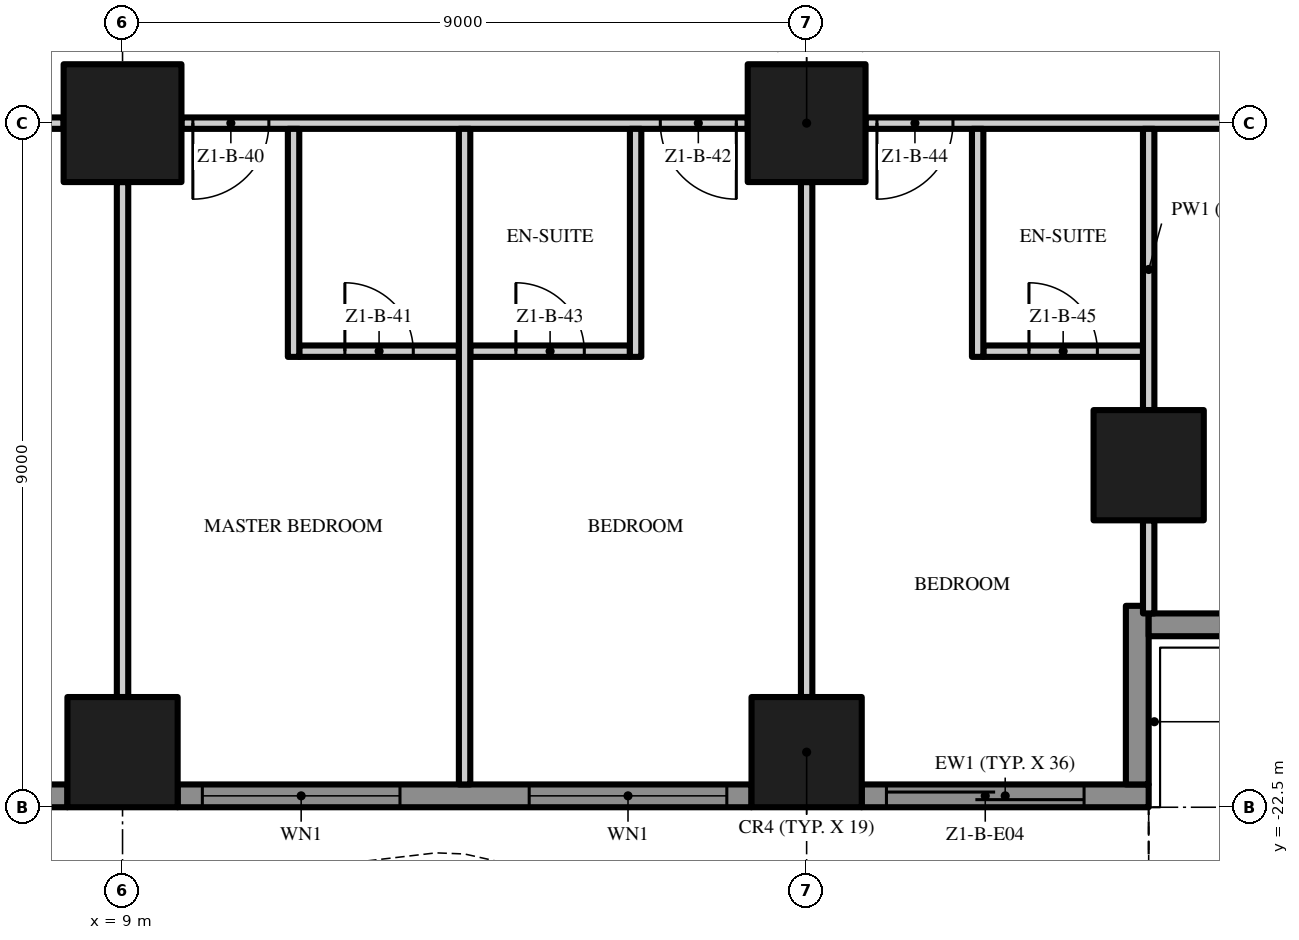
"""IFC4 building model, lengths in metres.
Left out: names, types, materials, properties, quantities, classifications, styles, units other than length and angle.
Written with IfcOpenShell. Run it as: python <this file> out.ifc"""

import sys

from ifc_helpers import new_model, si_unit, direction, frame, frame_2d, origin, origin_2d, place, context, subcontext, project, spatial, polyline, rectangle, outline, extrude, element, fill, save


model = new_model("IFC4")
c1 = context("Model", 3, precision=1e-05, world=origin(), true_north=direction((0.0, 1.0)))
c2 = subcontext(c1, "Body", "Model", "MODEL_VIEW")
j1 = project(units=[si_unit("LENGTHUNIT", "METRE"), si_unit("PLANEANGLEUNIT", "RADIAN")], contexts=[c1])
p1 = place(None, origin())
s1 = spatial("IfcSite", under=j1, at=p1, CompositionType="ELEMENT")
p2 = place(p1, origin())
s2 = spatial("IfcBuilding", under=s1, at=p2, CompositionType="ELEMENT")
p3 = place(p2, frame((0.0, 0.0, 26.4)))
s3 = spatial("IfcBuildingStorey", under=s2, at=p3, CompositionType="ELEMENT", Elevation=26.4)
p4 = place(p3, frame((18.0, -13.5, 0.0), z_axis=(0.0, 0.0, 1.0), x_axis=(1.0, 0.0, 0.0)))
e1 = element("IfcColumn", 1, at=p4, inside=s3, PredefinedType="COLUMN", context=c2, shape_type="SweptSolid", body=[
    extrude(rectangle(XDim=1.55, YDim=1.55, at=origin_2d()), origin(), (0.0, 0.0, 1.0), 3.5),
])
for number, where, z_axis, x_axis in (
    (2, (18.0, -21.775, 0.0), (0.0, 0.0, 1.0), (1.0, 0.0, 0.0)),
    (3, (22.5, -18.0, 0.0), (0.0, 0.0, 1.0), (1.0, 0.0, 0.0)),
):
    element("IfcColumn", number, at=place(p3, frame(where, z_axis=z_axis, x_axis=x_axis)), inside=s3, PredefinedType="COLUMN", context=c2, shape_type="SweptSolid", body=[
        extrude(rectangle(XDim=1.45, YDim=1.45, at=origin_2d()), origin(), (0.0, 0.0, 1.0), 3.5),
    ])
p5 = place(p3, frame((9.0, -13.5, 0.0), z_axis=(0.0, 0.0, 1.0), x_axis=(1.0, 0.0, 0.0)))
e4 = element("IfcColumn", 4, at=p5, inside=s3, PredefinedType="COLUMN", context=c2, shape_type="SweptSolid", body=[
    extrude(rectangle(XDim=1.55, YDim=1.55, at=origin_2d()), origin(), (0.0, 0.0, 1.0), 3.5),
])
p6 = place(p3, frame((9.0, -21.775, 0.0), z_axis=(0.0, 0.0, 1.0), x_axis=(1.0, 0.0, 0.0)))
e5 = element("IfcColumn", 5, at=p6, inside=s3, PredefinedType="COLUMN", context=c2, shape_type="SweptSolid", body=[
    extrude(rectangle(XDim=1.45, YDim=1.45, at=origin_2d()), origin(), (0.0, 0.0, 1.0), 3.5),
])
p7 = place(p3, frame((8.275, -22.35, 0.0), z_axis=(0.0, 0.0, 1.0), x_axis=(-1.0, 0.0, 0.0)))
e6 = element("IfcWall", 6, at=p7, inside=s3, PredefinedType="SOLIDWALL", context=c2, shape_type="SweptSolid", body=[
    extrude(rectangle(XDim=7.55, YDim=0.3, at=frame_2d((3.775, 0.0))), origin(), (0.0, 0.0, 1.0), 3.5),
])
p8 = place(p7, frame((4.625, 0.0, 0.45)))
e7 = element("IfcOpeningElement", 7, at=p8, cuts=e6, PredefinedType="OPENING", context=c2, shape_type="SweptSolid", body=[
    extrude(rectangle(XDim=2.6, YDim=2.65, at=frame_2d((1.3, 1.325))), frame((0.0, 0.16, 0.0), z_axis=(0.0, -1.0, 0.0), x_axis=(1.0, 0.0, 0.0)), (0.0, 0.0, 1.0), 0.32),
])
p9 = place(p7, frame((0.325, 0.0, 0.0)))
e8 = element("IfcOpeningElement", 8, at=p9, cuts=e6, PredefinedType="OPENING", context=c2, shape_type="SweptSolid", body=[
    extrude(rectangle(XDim=2.6, YDim=2.4, at=frame_2d((1.3, 1.2))), frame((0.0, 0.16, 0.0), z_axis=(0.0, -1.0, 0.0), x_axis=(1.0, 0.0, 0.0)), (0.0, 0.0, 1.0), 0.32),
])
p10 = place(p3, frame((17.275, -22.35, 0.0), z_axis=(0.0, 0.0, 1.0), x_axis=(-1.0, 0.0, 0.0)))
e9 = element("IfcWall", 9, at=p10, inside=s3, PredefinedType="SOLIDWALL", context=c2, shape_type="SweptSolid", body=[
    extrude(rectangle(XDim=7.55, YDim=0.3, at=frame_2d((3.775, 0.0))), origin(), (0.0, 0.0, 1.0), 3.5),
])
p11 = place(p10, frame((4.625, 0.0, 0.45)))
e10 = element("IfcOpeningElement", 10, at=p11, cuts=e9, PredefinedType="OPENING", context=c2, shape_type="SweptSolid", body=[
    extrude(rectangle(XDim=2.6, YDim=2.65, at=frame_2d((1.3, 1.325))), frame((0.0, 0.16, 0.0), z_axis=(0.0, -1.0, 0.0), x_axis=(1.0, 0.0, 0.0)), (0.0, 0.0, 1.0), 0.32),
])
p12 = place(p10, frame((0.325, 0.0, 0.45)))
e11 = element("IfcOpeningElement", 11, at=p12, cuts=e9, PredefinedType="OPENING", context=c2, shape_type="SweptSolid", body=[
    extrude(rectangle(XDim=2.6, YDim=2.65, at=frame_2d((1.3, 1.325))), frame((0.0, 0.16, 0.0), z_axis=(0.0, -1.0, 0.0), x_axis=(1.0, 0.0, 0.0)), (0.0, 0.0, 1.0), 0.32),
])
p13 = place(p3, frame((22.5, -22.35, 0.0), z_axis=(0.0, 0.0, 1.0), x_axis=(-1.0, 0.0, 0.0)))
e12 = element("IfcWall", 12, at=p13, inside=s3, PredefinedType="SOLIDWALL", context=c2, shape_type="SweptSolid", body=[
    extrude(rectangle(XDim=3.775, YDim=0.3, at=frame_2d((1.887, 0.0))), origin(), (0.0, 0.0, 1.0), 3.5),
])
p14 = place(p13, frame((0.85, 0.0, 0.0)))
e13 = element("IfcOpeningElement", 13, at=p14, cuts=e12, PredefinedType="OPENING", context=c2, shape_type="SweptSolid", body=[
    extrude(rectangle(XDim=2.6, YDim=2.4, at=frame_2d((1.3, 1.2))), frame((0.0, 0.16, 0.0), z_axis=(0.0, -1.0, 0.0), x_axis=(1.0, 0.0, 0.0)), (0.0, 0.0, 1.0), 0.32),
])
p15 = place(p3, frame((22.35, -19.85, 0.0), z_axis=(0.0, 0.0, 1.0), x_axis=(0.0, -1.0, 0.0)))
e14 = element("IfcWall", 14, at=p15, inside=s3, PredefinedType="SOLIDWALL", context=c2, shape_type="SweptSolid", body=[
    extrude(rectangle(XDim=2.35, YDim=0.3, at=frame_2d((1.175, 0.0))), origin(), (0.0, 0.0, 1.0), 3.5),
])
p16 = place(p3, frame((24.75, -20.1, 0.0), z_axis=(0.0, 0.0, 1.0), x_axis=(-1.0, 0.0, 0.0)))
e15 = element("IfcWall", 15, at=p16, inside=s3, PredefinedType="SOLIDWALL", context=c2, shape_type="SweptSolid", body=[
    extrude(rectangle(XDim=2.25, YDim=0.3, at=frame_2d((1.125, 0.0))), origin(), (0.0, 0.0, 1.0), 3.5),
])
p17 = place(p3, origin())
e16 = element("IfcWall", 16, at=p17, inside=s3, PredefinedType="USERDEFINED", context=c2, shape_type="SweptSolid", body=[
    extrude(outline(polyline([(-22.5, -25.149), (-21.0, -24.488), (-19.5, -23.755), (-18.0, -23.231), (-16.875, -23.1), (-16.5, -23.115), (-15.0, -23.451), (-13.5, -24.112), (-12.0, -24.845), (-10.5, -25.369), (-9.375, -25.5), (-9.0, -25.485), (-7.5, -25.149), (-6.0, -24.488), (-4.5, -23.755), (-3.0, -23.231), (-1.875, -23.1), (-1.5, -23.115), (0.0, -23.451), (1.5, -24.112), (3.0, -24.845), (4.5, -25.369), (5.625, -25.5), (6.0, -25.485), (7.5, -25.149), (9.0, -24.488), (10.5, -23.755), (12.0, -23.231), (13.125, -23.1), (13.5, -23.115), (15.0, -23.451), (16.5, -24.112), (18.0, -24.845), (19.5, -25.369), (20.625, -25.5), (21.0, -25.485), (22.5, -25.149), (22.445, -24.905), (20.967, -25.236), (20.635, -25.249), (19.556, -25.124), (18.096, -24.614), (16.605, -23.885), (15.079, -23.213), (13.533, -22.866), (13.115, -22.849), (11.944, -22.986), (10.404, -23.524), (8.895, -24.261), (7.421, -24.91), (5.967, -25.236), (5.635, -25.249), (4.556, -25.124), (3.096, -24.614), (1.605, -23.885), (0.079, -23.213), (-1.467, -22.866), (-1.885, -22.849), (-3.056, -22.986), (-4.596, -23.524), (-6.105, -24.261), (-7.579, -24.91), (-9.033, -25.236), (-9.365, -25.249), (-10.444, -25.124), (-11.904, -24.614), (-13.395, -23.885), (-14.921, -23.213), (-16.467, -22.866), (-16.885, -22.849), (-18.056, -22.986), (-19.596, -23.524), (-21.105, -24.261), (-22.601, -24.92), (-22.5, -25.149)])), origin(), (0.0, 0.0, 1.0), 0.9),
])
p18 = place(p3, frame((11.325, -16.5, 0.0), z_axis=(0.0, 0.0, 1.0), x_axis=(1.0, 0.0, 0.0)))
e17 = element("IfcWall", 17, at=p18, inside=s3, PredefinedType="PARTITIONING", context=c2, shape_type="SweptSolid", body=[
    extrude(rectangle(XDim=2.1, YDim=0.15, at=frame_2d((1.05, 0.0))), origin(), (0.0, 0.0, 1.0), 3.5),
])
p19 = place(p18, frame((0.6, 0.0, 0.0)))
e18 = element("IfcOpeningElement", 18, at=p19, cuts=e17, PredefinedType="OPENING", context=c2, shape_type="SweptSolid", body=[
    extrude(rectangle(XDim=0.9, YDim=2.1, at=frame_2d((0.45, 1.05))), frame((0.0, 0.085, 0.0), z_axis=(0.0, -1.0, 0.0), x_axis=(1.0, 0.0, 0.0)), (0.0, 0.0, 1.0), 0.17),
])
p20 = place(p3, frame((13.575, -16.5, 0.0), z_axis=(0.0, 0.0, 1.0), x_axis=(1.0, 0.0, 0.0)))
e19 = element("IfcWall", 19, at=p20, inside=s3, PredefinedType="PARTITIONING", context=c2, shape_type="SweptSolid", body=[
    extrude(rectangle(XDim=2.1, YDim=0.15, at=frame_2d((1.05, 0.0))), origin(), (0.0, 0.0, 1.0), 3.5),
])
p21 = place(p20, frame((0.6, 0.0, 0.0)))
e20 = element("IfcOpeningElement", 20, at=p21, cuts=e19, PredefinedType="OPENING", context=c2, shape_type="SweptSolid", body=[
    extrude(rectangle(XDim=0.9, YDim=2.1, at=frame_2d((0.45, 1.05))), frame((0.0, 0.085, 0.0), z_axis=(0.0, -1.0, 0.0), x_axis=(1.0, 0.0, 0.0)), (0.0, 0.0, 1.0), 0.17),
])
p22 = place(p3, frame((20.325, -16.5, 0.0), z_axis=(0.0, 0.0, 1.0), x_axis=(1.0, 0.0, 0.0)))
e21 = element("IfcWall", 21, at=p22, inside=s3, PredefinedType="PARTITIONING", context=c2, shape_type="SweptSolid", body=[
    extrude(rectangle(XDim=2.1, YDim=0.15, at=frame_2d((1.05, 0.0))), origin(), (0.0, 0.0, 1.0), 3.5),
])
p23 = place(p22, frame((0.6, 0.0, 0.0)))
e22 = element("IfcOpeningElement", 22, at=p23, cuts=e21, PredefinedType="OPENING", context=c2, shape_type="SweptSolid", body=[
    extrude(rectangle(XDim=0.9, YDim=2.1, at=frame_2d((0.45, 1.05))), frame((0.0, 0.085, 0.0), z_axis=(0.0, -1.0, 0.0), x_axis=(1.0, 0.0, 0.0)), (0.0, 0.0, 1.0), 0.17),
])
p24 = place(p3, frame((8.225, -13.5, 0.0), z_axis=(0.0, 0.0, 1.0), x_axis=(-1.0, 0.0, 0.0)))
e23 = element("IfcWall", 23, at=p24, inside=s3, PredefinedType="PARTITIONING", context=c2, shape_type="SweptSolid", body=[
    extrude(rectangle(XDim=7.45, YDim=0.15, at=frame_2d((3.725, 0.0))), origin(), (0.0, 0.0, 1.0), 3.5),
])
p25 = place(p24, frame((1.725, 0.0, 0.0)))
e24 = element("IfcOpeningElement", 24, at=p25, cuts=e23, PredefinedType="OPENING", context=c2, shape_type="SweptSolid", body=[
    extrude(rectangle(XDim=1.8, YDim=2.4, at=frame_2d((0.9, 1.2))), frame((0.0, 0.085, 0.0), z_axis=(0.0, -1.0, 0.0), x_axis=(1.0, 0.0, 0.0)), (0.0, 0.0, 1.0), 0.17),
])
p26 = place(p3, frame((17.225, -13.5, 0.0), z_axis=(0.0, 0.0, 1.0), x_axis=(-1.0, 0.0, 0.0)))
e25 = element("IfcWall", 25, at=p26, inside=s3, PredefinedType="PARTITIONING", context=c2, shape_type="SweptSolid", body=[
    extrude(rectangle(XDim=7.45, YDim=0.15, at=frame_2d((3.725, 0.0))), origin(), (0.0, 0.0, 1.0), 3.5),
])
p27 = place(p26, frame((6.3, 0.0, 0.0)))
e26 = element("IfcOpeningElement", 26, at=p27, cuts=e25, PredefinedType="OPENING", context=c2, shape_type="SweptSolid", body=[
    extrude(rectangle(XDim=1.0, YDim=2.4, at=frame_2d((0.5, 1.2))), frame((0.0, 0.085, 0.0), z_axis=(0.0, -1.0, 0.0), x_axis=(1.0, 0.0, 0.0)), (0.0, 0.0, 1.0), 0.17),
])
p28 = place(p26, frame((0.15, 0.0, 0.0)))
e27 = element("IfcOpeningElement", 27, at=p28, cuts=e25, PredefinedType="OPENING", context=c2, shape_type="SweptSolid", body=[
    extrude(rectangle(XDim=1.0, YDim=2.4, at=frame_2d((0.5, 1.2))), frame((0.0, 0.085, 0.0), z_axis=(0.0, -1.0, 0.0), x_axis=(1.0, 0.0, 0.0)), (0.0, 0.0, 1.0), 0.17),
])
p29 = place(p3, frame((25.55, -13.5, 0.0), z_axis=(0.0, 0.0, 1.0), x_axis=(-1.0, 0.0, 0.0)))
e28 = element("IfcWall", 28, at=p29, inside=s3, PredefinedType="PARTITIONING", context=c2, shape_type="SweptSolid", body=[
    extrude(rectangle(XDim=6.775, YDim=0.15, at=frame_2d((3.388, 0.0))), origin(), (0.0, 0.0, 1.0), 3.5),
])
p30 = place(p29, frame((5.625, 0.0, 0.0)))
e29 = element("IfcOpeningElement", 29, at=p30, cuts=e28, PredefinedType="OPENING", context=c2, shape_type="SweptSolid", body=[
    extrude(rectangle(XDim=1.0, YDim=2.4, at=frame_2d((0.5, 1.2))), frame((0.0, 0.085, 0.0), z_axis=(0.0, -1.0, 0.0), x_axis=(1.0, 0.0, 0.0)), (0.0, 0.0, 1.0), 0.17),
])
p31 = place(p29, frame((0.15, 0.0, 0.0)))
e30 = element("IfcOpeningElement", 30, at=p31, cuts=e28, PredefinedType="OPENING", context=c2, shape_type="SweptSolid", body=[
    extrude(rectangle(XDim=1.5, YDim=2.4, at=frame_2d((0.75, 1.2))), frame((0.0, 0.085, 0.0), z_axis=(0.0, -1.0, 0.0), x_axis=(1.0, 0.0, 0.0)), (0.0, 0.0, 1.0), 0.17),
])
p32 = place(p3, frame((9.0, -21.05, 0.0), z_axis=(0.0, 0.0, 1.0), x_axis=(0.0, 1.0, 0.0)))
e31 = element("IfcWall", 31, at=p32, inside=s3, PredefinedType="PARTITIONING", context=c2, shape_type="SweptSolid", body=[
    extrude(rectangle(XDim=6.775, YDim=0.15, at=frame_2d((3.388, 0.0))), origin(), (0.0, 0.0, 1.0), 3.5),
])
p33 = place(p3, frame((11.25, -16.575, 0.0), z_axis=(0.0, 0.0, 1.0), x_axis=(0.0, 1.0, 0.0)))
e32 = element("IfcWall", 32, at=p33, inside=s3, PredefinedType="PARTITIONING", context=c2, shape_type="SweptSolid", body=[
    extrude(rectangle(XDim=3.0, YDim=0.15, at=frame_2d((1.5, 0.0))), origin(), (0.0, 0.0, 1.0), 3.5),
])
p34 = place(p3, frame((13.5, -22.2, 0.0), z_axis=(0.0, 0.0, 1.0), x_axis=(0.0, 1.0, 0.0)))
e33 = element("IfcWall", 33, at=p34, inside=s3, PredefinedType="PARTITIONING", context=c2, shape_type="SweptSolid", body=[
    extrude(rectangle(XDim=8.625, YDim=0.15, at=frame_2d((4.312, 0.0))), origin(), (0.0, 0.0, 1.0), 3.5),
])
p35 = place(p3, frame((15.75, -16.575, 0.0), z_axis=(0.0, 0.0, 1.0), x_axis=(0.0, 1.0, 0.0)))
e34 = element("IfcWall", 34, at=p35, inside=s3, PredefinedType="PARTITIONING", context=c2, shape_type="SweptSolid", body=[
    extrude(rectangle(XDim=3.0, YDim=0.15, at=frame_2d((1.5, 0.0))), origin(), (0.0, 0.0, 1.0), 3.5),
])
p36 = place(p3, frame((18.0, -21.05, 0.0), z_axis=(0.0, 0.0, 1.0), x_axis=(0.0, 1.0, 0.0)))
e35 = element("IfcWall", 35, at=p36, inside=s3, PredefinedType="PARTITIONING", context=c2, shape_type="SweptSolid", body=[
    extrude(rectangle(XDim=6.775, YDim=0.15, at=frame_2d((3.388, 0.0))), origin(), (0.0, 0.0, 1.0), 3.5),
])
p37 = place(p3, frame((20.25, -16.575, 0.0), z_axis=(0.0, 0.0, 1.0), x_axis=(0.0, 1.0, 0.0)))
e36 = element("IfcWall", 36, at=p37, inside=s3, PredefinedType="PARTITIONING", context=c2, shape_type="SweptSolid", body=[
    extrude(rectangle(XDim=3.0, YDim=0.15, at=frame_2d((1.5, 0.0))), origin(), (0.0, 0.0, 1.0), 3.5),
])
p38 = place(p3, frame((22.5, -19.95, 0.0), z_axis=(0.0, 0.0, 1.0), x_axis=(0.0, 1.0, 0.0)))
e37 = element("IfcWall", 37, at=p38, inside=s3, PredefinedType="PARTITIONING", context=c2, shape_type="SweptSolid", body=[
    extrude(rectangle(XDim=1.225, YDim=0.15, at=frame_2d((0.613, 0.0))), origin(), (0.0, 0.0, 1.0), 3.5),
])
p39 = place(p3, frame((22.5, -17.275, 0.0), z_axis=(0.0, 0.0, 1.0), x_axis=(0.0, 1.0, 0.0)))
e38 = element("IfcWall", 38, at=p39, inside=s3, PredefinedType="PARTITIONING", context=c2, shape_type="SweptSolid", body=[
    extrude(rectangle(XDim=3.7, YDim=0.15, at=frame_2d((1.85, 0.0))), origin(), (0.0, 0.0, 1.0), 3.5),
])
p40 = place(p11, origin())
e39 = element("IfcWindow", 39, at=p40, inside=s3, PartitioningType="SINGLE_PANEL", PredefinedType="WINDOW", context=c2, shape_type="SweptSolid", body=[
    extrude(rectangle(XDim=2.6, YDim=2.65, at=frame_2d((1.3, 1.325))), frame((0.0, 0.03, 0.0), z_axis=(0.0, -1.0, 0.0), x_axis=(1.0, 0.0, 0.0)), (0.0, 0.0, 1.0), 0.06),
])
fill(e10, e39)
p41 = place(p12, origin())
e40 = element("IfcWindow", 40, at=p41, inside=s3, PartitioningType="SINGLE_PANEL", PredefinedType="WINDOW", context=c2, shape_type="SweptSolid", body=[
    extrude(rectangle(XDim=2.6, YDim=2.65, at=frame_2d((1.3, 1.325))), frame((0.0, 0.03, 0.0), z_axis=(0.0, -1.0, 0.0), x_axis=(1.0, 0.0, 0.0)), (0.0, 0.0, 1.0), 0.06),
])
fill(e11, e40)
p42 = place(p14, origin())
e41 = element("IfcDoor", 41, at=p42, inside=s3, OperationType="SINGLE_SWING_LEFT", PredefinedType="DOOR", context=c2, shape_type="SweptSolid", body=[
    extrude(rectangle(XDim=2.6, YDim=2.4, at=frame_2d((1.3, 1.2))), frame((0.0, 0.025, 0.0), z_axis=(0.0, -1.0, 0.0), x_axis=(1.0, 0.0, 0.0)), (0.0, 0.0, 1.0), 0.05),
])
fill(e13, e41)
p43 = place(p27, origin())
e42 = element("IfcDoor", 42, at=p43, inside=s3, OperationType="SINGLE_SWING_RIGHT", PredefinedType="DOOR", context=c2, shape_type="SweptSolid", body=[
    extrude(rectangle(XDim=1.0, YDim=2.4, at=frame_2d((0.5, 1.2))), frame((0.0, 0.025, 0.0), z_axis=(0.0, -1.0, 0.0), x_axis=(1.0, 0.0, 0.0)), (0.0, 0.0, 1.0), 0.05),
])
fill(e26, e42)
p44 = place(p19, origin())
e43 = element("IfcDoor", 43, at=p44, inside=s3, OperationType="SINGLE_SWING_LEFT", PredefinedType="DOOR", context=c2, shape_type="SweptSolid", body=[
    extrude(rectangle(XDim=0.9, YDim=2.1, at=frame_2d((0.45, 1.05))), frame((0.0, 0.025, 0.0), z_axis=(0.0, -1.0, 0.0), x_axis=(1.0, 0.0, 0.0)), (0.0, 0.0, 1.0), 0.05),
])
fill(e18, e43)
p45 = place(p28, origin())
e44 = element("IfcDoor", 44, at=p45, inside=s3, OperationType="SINGLE_SWING_LEFT", PredefinedType="DOOR", context=c2, shape_type="SweptSolid", body=[
    extrude(rectangle(XDim=1.0, YDim=2.4, at=frame_2d((0.5, 1.2))), frame((0.0, 0.025, 0.0), z_axis=(0.0, -1.0, 0.0), x_axis=(1.0, 0.0, 0.0)), (0.0, 0.0, 1.0), 0.05),
])
fill(e27, e44)
p46 = place(p21, origin())
e45 = element("IfcDoor", 45, at=p46, inside=s3, OperationType="SINGLE_SWING_LEFT", PredefinedType="DOOR", context=c2, shape_type="SweptSolid", body=[
    extrude(rectangle(XDim=0.9, YDim=2.1, at=frame_2d((0.45, 1.05))), frame((0.0, 0.025, 0.0), z_axis=(0.0, -1.0, 0.0), x_axis=(1.0, 0.0, 0.0)), (0.0, 0.0, 1.0), 0.05),
])
fill(e20, e45)
p47 = place(p30, origin())
e46 = element("IfcDoor", 46, at=p47, inside=s3, OperationType="SINGLE_SWING_RIGHT", PredefinedType="DOOR", context=c2, shape_type="SweptSolid", body=[
    extrude(rectangle(XDim=1.0, YDim=2.4, at=frame_2d((0.5, 1.2))), frame((0.0, 0.025, 0.0), z_axis=(0.0, -1.0, 0.0), x_axis=(1.0, 0.0, 0.0)), (0.0, 0.0, 1.0), 0.05),
])
fill(e29, e46)
p48 = place(p23, origin())
e47 = element("IfcDoor", 47, at=p48, inside=s3, OperationType="SINGLE_SWING_LEFT", PredefinedType="DOOR", context=c2, shape_type="SweptSolid", body=[
    extrude(rectangle(XDim=0.9, YDim=2.1, at=frame_2d((0.45, 1.05))), frame((0.0, 0.025, 0.0), z_axis=(0.0, -1.0, 0.0), x_axis=(1.0, 0.0, 0.0)), (0.0, 0.0, 1.0), 0.05),
])
fill(e22, e47)
save(model, sys.argv[1])
